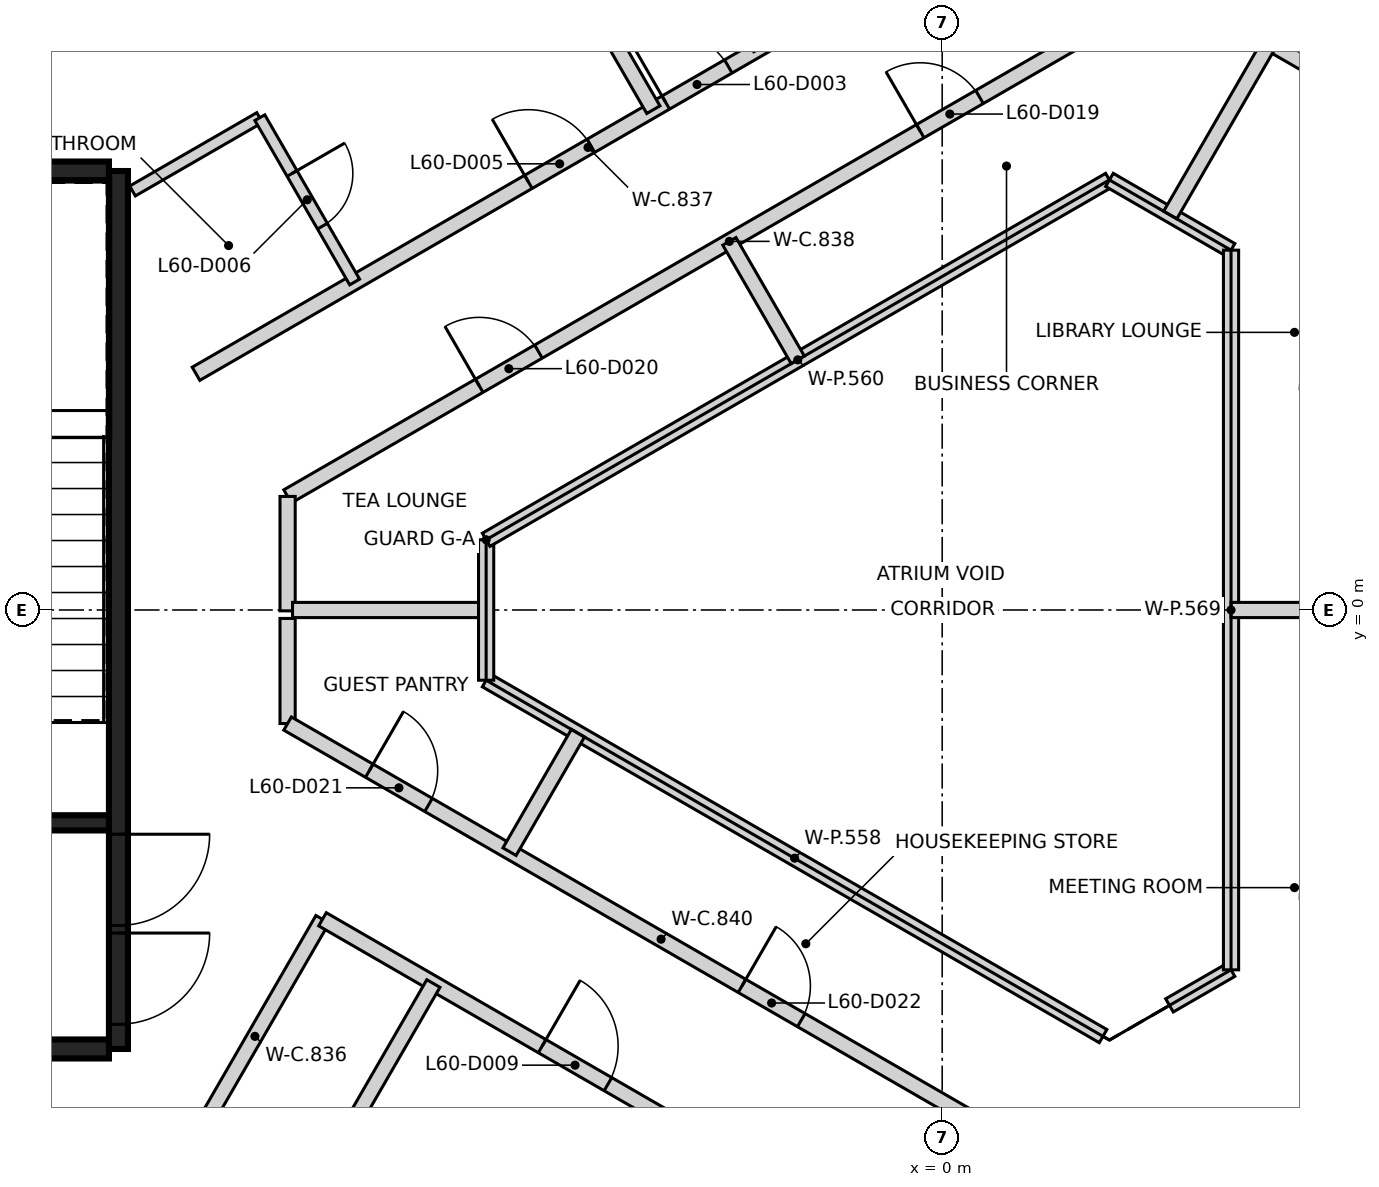
"""IFC4 building model, lengths in metres.
Left out: names, types, materials, properties, quantities, classifications, styles, units other than length and angle.
Written with IfcOpenShell. Run it as: python <this file> out.ifc"""

import sys

from ifc_helpers import new_model, si_unit, direction, frame, frame_2d, origin, place, context, subcontext, project, spatial, rectangle, extrude, element, fill, save


model = new_model("IFC4")
c1 = context("Model", 3, precision=1e-05, world=origin(), true_north=direction((0.0, 1.0)))
c2 = subcontext(c1, "Body", "Model", "MODEL_VIEW")
j1 = project(units=[si_unit("LENGTHUNIT", "METRE"), si_unit("PLANEANGLEUNIT", "RADIAN")], contexts=[c1])
p1 = place(None, origin())
s1 = spatial("IfcSite", under=j1, at=p1, CompositionType="ELEMENT")
p2 = place(p1, origin())
s2 = spatial("IfcBuilding", under=s1, at=p2, CompositionType="ELEMENT")
p3 = place(p2, frame((0.0, 0.0, 239.4)))
s3 = spatial("IfcBuildingStorey", under=s2, at=p3, CompositionType="ELEMENT", Elevation=239.4)
p4 = place(p3, frame((-10.837, 5.775, 0.0), z_axis=(0.0, 0.0, 1.0), x_axis=(0.0, -1.0, 0.0)))
e1 = element("IfcWall", 1, at=p4, inside=s3, PredefinedType="SHEAR", context=c2, shape_type="SweptSolid", body=[
    extrude(rectangle(XDim=11.55, YDim=0.25, at=frame_2d((5.775, 0.0))), origin(), (0.0, 0.0, 1.0), 3.25),
])
p5 = place(p4, frame((10.025, 0.0, 0.0)))
e2 = element("IfcOpeningElement", 2, at=p5, cuts=e1, PredefinedType="OPENING", context=c2, shape_type="SweptSolid", body=[
    extrude(rectangle(XDim=1.2, YDim=2.1, at=frame_2d((0.6, 1.05))), frame((0.0, 0.135, 0.0), z_axis=(0.0, -1.0, 0.0), x_axis=(1.0, 0.0, 0.0)), (0.0, 0.0, 1.0), 0.27),
])
p6 = place(p4, frame((8.725, 0.0, 0.0)))
e3 = element("IfcOpeningElement", 3, at=p6, cuts=e1, PredefinedType="OPENING", context=c2, shape_type="SweptSolid", body=[
    extrude(rectangle(XDim=1.2, YDim=2.1, at=frame_2d((0.6, 1.05))), frame((0.0, 0.135, 0.0), z_axis=(0.0, -1.0, 0.0), x_axis=(1.0, 0.0, 0.0)), (0.0, 0.0, 1.0), 0.27),
])
p7 = place(p3, frame((-10.963, -5.775, 0.0), z_axis=(0.0, 0.0, 1.0), x_axis=(-1.0, 0.0, 0.0)))
e4 = element("IfcWall", 4, at=p7, inside=s3, PredefinedType="SHEAR", context=c2, shape_type="SweptSolid", body=[
    extrude(rectangle(XDim=5.225, YDim=0.25, at=frame_2d((2.612, 0.0))), origin(), (0.0, 0.0, 1.0), 3.25),
])
p8 = place(p3, frame((-16.472, 5.775, 0.0), z_axis=(0.0, 0.0, 1.0), x_axis=(1.0, 0.0, 0.0)))
e5 = element("IfcWall", 5, at=p8, inside=s3, PredefinedType="SHEAR", context=c2, shape_type="SweptSolid", body=[
    extrude(rectangle(XDim=5.51, YDim=0.25, at=frame_2d((2.755, 0.0))), origin(), (0.0, 0.0, 1.0), 3.25),
])
p9 = place(p3, frame((-10.963, -2.8, 0.0), z_axis=(0.0, 0.0, 1.0), x_axis=(-1.0, 0.0, 0.0)))
e6 = element("IfcWall", 6, at=p9, inside=s3, PredefinedType="SHEAR", context=c2, shape_type="SweptSolid", body=[
    extrude(rectangle(XDim=5.098, YDim=0.2, at=frame_2d((2.549, 0.0))), origin(), (0.0, 0.0, 1.0), 3.25),
])
p10 = place(p9, frame((1.774, 0.0, 0.0)))
e7 = element("IfcOpeningElement", 7, at=p10, cuts=e6, PredefinedType="OPENING", context=c2, shape_type="SweptSolid", body=[
    extrude(rectangle(XDim=1.4, YDim=2.1, at=frame_2d((0.7, 1.05))), frame((0.0, 0.11, 0.0), z_axis=(0.0, -1.0, 0.0), x_axis=(1.0, 0.0, 0.0)), (0.0, 0.0, 1.0), 0.22),
])
p11 = place(p3, frame((10.42, 6.498, 0.0), z_axis=(0.0, 0.0, 1.0), x_axis=(-0.866021906294, 0.500006057782, 0.0)))
e8 = element("IfcWall", 8, at=p11, inside=s3, PredefinedType="SHEAR", context=c2, shape_type="SweptSolid", body=[
    extrude(rectangle(XDim=11.55, YDim=0.25, at=frame_2d((5.775, 0.0))), origin(), (0.0, 0.0, 1.0), 3.25),
])
p12 = place(p11, frame((10.025, 0.0, 0.0)))
e9 = element("IfcOpeningElement", 9, at=p12, cuts=e8, PredefinedType="OPENING", context=c2, shape_type="SweptSolid", body=[
    extrude(rectangle(XDim=1.2, YDim=2.1, at=frame_2d((0.6, 1.05))), frame((0.0, 0.135, 0.0), z_axis=(0.0, -1.0, 0.0), x_axis=(1.0, 0.0, 0.0)), (0.0, 0.0, 1.0), 0.27),
])
p13 = place(p11, frame((8.725, 0.0, 0.0)))
e10 = element("IfcOpeningElement", 10, at=p13, cuts=e8, PredefinedType="OPENING", context=c2, shape_type="SweptSolid", body=[
    extrude(rectangle(XDim=1.2, YDim=2.1, at=frame_2d((0.6, 1.05))), frame((0.0, 0.135, 0.0), z_axis=(0.0, -1.0, 0.0), x_axis=(1.0, 0.0, 0.0)), (0.0, 0.0, 1.0), 0.27),
])
p14 = place(p3, frame((0.417, -12.273, 0.0), z_axis=(0.0, 0.0, 1.0), x_axis=(0.866021906294, 0.500006057782, 0.0)))
e11 = element("IfcWall", 11, at=p14, inside=s3, PredefinedType="SHEAR", context=c2, shape_type="SweptSolid", body=[
    extrude(rectangle(XDim=11.55, YDim=0.25, at=frame_2d((5.775, 0.0))), origin(), (0.0, 0.0, 1.0), 3.25),
])
p15 = place(p14, frame((10.025, 0.0, 0.0)))
e12 = element("IfcOpeningElement", 12, at=p15, cuts=e11, PredefinedType="OPENING", context=c2, shape_type="SweptSolid", body=[
    extrude(rectangle(XDim=1.2, YDim=2.1, at=frame_2d((0.6, 1.05))), frame((0.0, 0.135, 0.0), z_axis=(0.0, -1.0, 0.0), x_axis=(1.0, 0.0, 0.0)), (0.0, 0.0, 1.0), 0.27),
])
p16 = place(p14, frame((8.725, 0.0, 0.0)))
e13 = element("IfcOpeningElement", 13, at=p16, cuts=e11, PredefinedType="OPENING", context=c2, shape_type="SweptSolid", body=[
    extrude(rectangle(XDim=1.2, YDim=2.1, at=frame_2d((0.6, 1.05))), frame((0.0, 0.135, 0.0), z_axis=(0.0, -1.0, 0.0), x_axis=(1.0, 0.0, 0.0)), (0.0, 0.0, 1.0), 0.27),
])
p17 = place(p3, frame((-9.931, -7.149, 0.0), z_axis=(0.0, 0.0, 1.0), x_axis=(0.499934418432, 0.86606326401, 0.0)))
e14 = element("IfcWall", 14, at=p17, inside=s3, PredefinedType="PARTITIONING", context=c2, shape_type="SweptSolid", body=[
    extrude(rectangle(XDim=3.556, YDim=0.2, at=frame_2d((1.778, 0.0))), origin(), (0.0, 0.0, 1.0), 3.25),
])
p18 = place(p3, frame((-9.817, 3.108, 0.0), z_axis=(0.0, 0.0, 1.0), x_axis=(0.86603471326, 0.499983875168, 0.0)))
e15 = element("IfcWall", 15, at=p18, inside=s3, PredefinedType="PARTITIONING", context=c2, shape_type="SweptSolid", body=[
    extrude(rectangle(XDim=11.911, YDim=0.2, at=frame_2d((5.955, 0.0))), origin(), (0.0, 0.0, 1.0), 3.25),
])
p19 = place(p18, frame((7.136, 0.0, 0.0)))
e16 = element("IfcOpeningElement", 16, at=p19, cuts=e15, PredefinedType="OPENING", context=c2, shape_type="SweptSolid", body=[
    extrude(rectangle(XDim=0.95, YDim=2.1, at=frame_2d((0.475, 1.05))), frame((0.0, 0.11, 0.0), z_axis=(0.0, -1.0, 0.0), x_axis=(1.0, 0.0, 0.0)), (0.0, 0.0, 1.0), 0.22),
])
p20 = place(p18, frame((5.049, 0.0, 0.0)))
e17 = element("IfcOpeningElement", 17, at=p20, cuts=e15, PredefinedType="OPENING", context=c2, shape_type="SweptSolid", body=[
    extrude(rectangle(XDim=0.95, YDim=2.1, at=frame_2d((0.475, 1.05))), frame((0.0, 0.11, 0.0), z_axis=(0.0, -1.0, 0.0), x_axis=(1.0, 0.0, 0.0)), (0.0, 0.0, 1.0), 0.22),
])
p21 = place(p3, frame((-8.612, 1.494, 0.0), z_axis=(0.0, 0.0, 1.0), x_axis=(0.8660441356, 0.49996755414, 0.0)))
e18 = element("IfcWall", 18, at=p21, inside=s3, PredefinedType="PARTITIONING", context=c2, shape_type="SweptSolid", body=[
    extrude(rectangle(XDim=13.422, YDim=0.2, at=frame_2d((6.711, 0.0))), origin(), (0.0, 0.0, 1.0), 3.25),
])
p22 = place(p21, frame((9.611, 0.0, 0.0)))
e19 = element("IfcOpeningElement", 19, at=p22, cuts=e18, PredefinedType="OPENING", context=c2, shape_type="SweptSolid", body=[
    extrude(rectangle(XDim=0.9, YDim=2.1, at=frame_2d((0.45, 1.05))), frame((0.0, 0.11, 0.0), z_axis=(0.0, -1.0, 0.0), x_axis=(1.0, 0.0, 0.0)), (0.0, 0.0, 1.0), 0.22),
])
p23 = place(p21, frame((2.911, 0.0, 0.0)))
e20 = element("IfcOpeningElement", 20, at=p23, cuts=e18, PredefinedType="OPENING", context=c2, shape_type="SweptSolid", body=[
    extrude(rectangle(XDim=0.9, YDim=2.1, at=frame_2d((0.45, 1.05))), frame((0.0, 0.11, 0.0), z_axis=(0.0, -1.0, 0.0), x_axis=(1.0, 0.0, 0.0)), (0.0, 0.0, 1.0), 0.22),
])
p24 = place(p3, frame((-8.612, -1.494, 0.0), z_axis=(0.0, 0.0, 1.0), x_axis=(0.0, 1.0, 0.0)))
e21 = element("IfcWall", 21, at=p24, inside=s3, PredefinedType="PARTITIONING", context=c2, shape_type="SweptSolid", body=[
    extrude(rectangle(XDim=1.383, YDim=0.2, at=frame_2d((0.691, 0.0))), origin(), (0.0, 0.0, 1.0), 3.25),
])
p25 = place(p3, frame((-8.612, -1.494, 0.0), z_axis=(0.0, 0.0, 1.0), x_axis=(0.866035468681, -0.499982566683, 0.0)))
e22 = element("IfcWall", 22, at=p25, inside=s3, PredefinedType="PARTITIONING", context=c2, shape_type="SweptSolid", body=[
    extrude(rectangle(XDim=11.348, YDim=0.2, at=frame_2d((5.674, 0.0))), origin(), (0.0, 0.0, 1.0), 3.25),
])
p26 = place(p25, frame((1.241, 0.0, 0.0)))
e23 = element("IfcOpeningElement", 23, at=p26, cuts=e22, PredefinedType="OPENING", context=c2, shape_type="SweptSolid", body=[
    extrude(rectangle(XDim=0.9, YDim=2.1, at=frame_2d((0.45, 1.05))), frame((0.0, 0.11, 0.0), z_axis=(0.0, -1.0, 0.0), x_axis=(1.0, 0.0, 0.0)), (0.0, 0.0, 1.0), 0.22),
])
p27 = place(p25, frame((6.903, 0.0, 0.0)))
e24 = element("IfcOpeningElement", 24, at=p27, cuts=e22, PredefinedType="OPENING", context=c2, shape_type="SweptSolid", body=[
    extrude(rectangle(XDim=0.9, YDim=2.1, at=frame_2d((0.45, 1.05))), frame((0.0, 0.11, 0.0), z_axis=(0.0, -1.0, 0.0), x_axis=(1.0, 0.0, 0.0)), (0.0, 0.0, 1.0), 0.22),
])
p28 = place(p3, frame((-8.612, -0.011, 0.0), z_axis=(0.0, 0.0, 1.0), x_axis=(0.0, 1.0, 0.0)))
e25 = element("IfcWall", 25, at=p28, inside=s3, PredefinedType="PARTITIONING", context=c2, shape_type="SweptSolid", body=[
    extrude(rectangle(XDim=1.505, YDim=0.2, at=frame_2d((0.752, 0.0))), origin(), (0.0, 0.0, 1.0), 3.25),
])
p29 = place(p3, frame((-8.153, -4.069, 0.0), z_axis=(0.0, 0.0, 1.0), x_axis=(0.865955522833, -0.500121017829, 0.0)))
e26 = element("IfcWall", 26, at=p29, inside=s3, PredefinedType="PARTITIONING", context=c2, shape_type="SweptSolid", body=[
    extrude(rectangle(XDim=12.937, YDim=0.2, at=frame_2d((6.469, 0.0))), origin(), (0.0, 0.0, 1.0), 3.25),
])
p30 = place(p29, frame((3.337, 0.0, 0.0)))
e27 = element("IfcOpeningElement", 27, at=p30, cuts=e26, PredefinedType="OPENING", context=c2, shape_type="SweptSolid", body=[
    extrude(rectangle(XDim=1.0, YDim=2.1, at=frame_2d((0.5, 1.05))), frame((0.0, 0.11, 0.0), z_axis=(0.0, -1.0, 0.0), x_axis=(1.0, 0.0, 0.0)), (0.0, 0.0, 1.0), 0.22),
])
p31 = place(p29, frame((9.153, 0.0, 0.0)))
e28 = element("IfcOpeningElement", 28, at=p31, cuts=e26, PredefinedType="OPENING", context=c2, shape_type="SweptSolid", body=[
    extrude(rectangle(XDim=0.95, YDim=2.1, at=frame_2d((0.475, 1.05))), frame((0.0, 0.11, 0.0), z_axis=(0.0, -1.0, 0.0), x_axis=(1.0, 0.0, 0.0)), (0.0, 0.0, 1.0), 0.22),
])
p32 = place(p29, frame((11.144, 0.0, 0.0)))
e29 = element("IfcOpeningElement", 29, at=p32, cuts=e26, PredefinedType="OPENING", context=c2, shape_type="SweptSolid", body=[
    extrude(rectangle(XDim=1.0, YDim=2.1, at=frame_2d((0.5, 1.05))), frame((0.0, 0.11, 0.0), z_axis=(0.0, -1.0, 0.0), x_axis=(1.0, 0.0, 0.0)), (0.0, 0.0, 1.0), 0.22),
])
p33 = place(p3, frame((3.011, 8.204, 0.0), z_axis=(0.0, 0.0, 1.0), x_axis=(0.86628077395, -0.499557424812, 0.0)))
e30 = element("IfcWall", 30, at=p33, inside=s3, PredefinedType="PARTITIONING", context=c2, shape_type="SweptSolid", body=[
    extrude(rectangle(XDim=2.989, YDim=0.2, at=frame_2d((1.494, 0.0))), origin(), (0.0, 0.0, 1.0), 3.25),
])
p34 = place(p3, frame((-12.407, -14.806, 0.0), z_axis=(0.0, 0.0, 1.0), x_axis=(0.500104175471, 0.865965249693, 0.0)))
e31 = element("IfcWall", 31, at=p34, inside=s3, PredefinedType="PARTITIONING", context=c2, shape_type="SweptSolid", body=[
    extrude(rectangle(XDim=11.423, YDim=0.2, at=frame_2d((5.711, 0.0))), origin(), (0.0, 0.0, 1.0), 2.35),
])
p35 = place(p3, frame((-9.525, 16.498, 0.0), z_axis=(0.0, 0.0, 1.0), x_axis=(0.500030684965, -0.866007687087, 0.0)))
e32 = element("IfcWall", 32, at=p35, inside=s3, PredefinedType="PARTITIONING", context=c2, shape_type="SweptSolid", body=[
    extrude(rectangle(XDim=11.45, YDim=0.2, at=frame_2d((5.725, 0.0))), origin(), (0.0, 0.0, 1.0), 3.25),
])
p36 = place(p3, frame((-8.547, 0.0, 0.0), z_axis=(0.0, 0.0, 1.0), x_axis=(1.0, 0.0, 0.0)))
e33 = element("IfcWall", 33, at=p36, inside=s3, PredefinedType="PARTITIONING", context=c2, shape_type="SweptSolid", body=[
    extrude(rectangle(XDim=2.547, YDim=0.2, at=frame_2d((1.273, 0.0))), origin(), (0.0, 0.0, 1.0), 3.25),
])
p37 = place(p3, frame((-6.0, -0.924, 0.0), z_axis=(0.0, 0.0, 1.0), x_axis=(0.866223755075, -0.499656288007, 0.0)))
e34 = element("IfcWall", 34, at=p37, inside=s3, PredefinedType="PARTITIONING", context=c2, shape_type="SweptSolid", body=[
    extrude(rectangle(XDim=9.37, YDim=0.2, at=frame_2d((4.685, 0.0))), origin(), (0.0, 0.0, 1.0), 3.25),
])
p38 = place(p3, frame((-6.0, -0.924, 0.0), z_axis=(0.0, 0.0, 1.0), x_axis=(0.0, 1.0, 0.0)))
e35 = element("IfcWall", 35, at=p38, inside=s3, PredefinedType="PARTITIONING", context=c2, shape_type="SweptSolid", body=[
    extrude(rectangle(XDim=1.848, YDim=0.2, at=frame_2d((0.924, 0.0))), origin(), (0.0, 0.0, 1.0), 3.25),
])
p39 = place(p3, frame((-6.0, 0.924, 0.0), z_axis=(0.0, 0.0, 1.0), x_axis=(0.866012967051, 0.500021540435, 0.0)))
e36 = element("IfcWall", 36, at=p39, inside=s3, PredefinedType="PARTITIONING", context=c2, shape_type="SweptSolid", body=[
    extrude(rectangle(XDim=9.468, YDim=0.2, at=frame_2d((4.734, 0.0))), origin(), (0.0, 0.0, 1.0), 3.25),
])
for number, where, z_axis, x_axis in (
    (37, (-5.692, -3.179, 0.0), (0.0, 0.0, 1.0), (0.5, 0.866, 0.0)),
    (38, (-2.8, 4.85, 0.0), (0.0, 0.0, 1.0), (0.5, -0.866, 0.0)),
):
    element("IfcWall", number, at=place(p3, frame(where, z_axis=z_axis, x_axis=x_axis)), inside=s3, PredefinedType="PARTITIONING", context=c2, shape_type="SweptSolid", body=[
        extrude(rectangle(XDim=1.8, YDim=0.2, at=frame_2d((0.9, 0.0))), origin(), (0.0, 0.0, 1.0), 3.25),
    ])
p40 = place(p3, frame((2.2, 5.658, 0.0), z_axis=(0.0, 0.0, 1.0), x_axis=(0.865818011038, -0.500359042851, 0.0)))
e39 = element("IfcWall", 39, at=p40, inside=s3, PredefinedType="PARTITIONING", context=c2, shape_type="SweptSolid", body=[
    extrude(rectangle(XDim=1.848, YDim=0.2, at=frame_2d((0.924, 0.0))), origin(), (0.0, 0.0, 1.0), 3.25),
])
p41 = place(p3, frame((2.99, -5.202, 0.0), z_axis=(0.0, 0.0, 1.0), x_axis=(0.865872609263, 0.500264554538, 0.0)))
e40 = element("IfcWall", 40, at=p41, inside=s3, PredefinedType="PARTITIONING", context=c2, shape_type="SweptSolid", body=[
    extrude(rectangle(XDim=0.936, YDim=0.2, at=frame_2d((0.468, 0.0))), origin(), (0.0, 0.0, 1.0), 3.25),
])
p42 = place(p3, frame((3.0, 5.196, 0.0), z_axis=(0.0, 0.0, 1.0), x_axis=(0.500076354988, 0.865981315724, 0.0)))
e41 = element("IfcWall", 41, at=p42, inside=s3, PredefinedType="PARTITIONING", context=c2, shape_type="SweptSolid", body=[
    extrude(rectangle(XDim=2.607, YDim=0.2, at=frame_2d((1.304, 0.0))), origin(), (0.0, 0.0, 1.0), 3.25),
])
p43 = place(p3, frame((3.8, -4.734, 0.0), z_axis=(0.0, 0.0, 1.0), x_axis=(0.0, 1.0, 0.0)))
e42 = element("IfcWall", 42, at=p43, inside=s3, PredefinedType="PARTITIONING", context=c2, shape_type="SweptSolid", body=[
    extrude(rectangle(XDim=9.468, YDim=0.2, at=frame_2d((4.734, 0.0))), origin(), (0.0, 0.0, 1.0), 3.25),
])
p44 = place(p3, frame((3.8, 0.0, 0.0), z_axis=(0.0, 0.0, 1.0), x_axis=(1.0, 0.0, 0.0)))
e43 = element("IfcWall", 43, at=p44, inside=s3, PredefinedType="PARTITIONING", context=c2, shape_type="SweptSolid", body=[
    extrude(rectangle(XDim=1.8, YDim=0.2, at=frame_2d((0.9, 0.0))), origin(), (0.0, 0.0, 1.0), 3.25),
])
p45 = place(p3, frame((-10.652, 5.512, 0.0), z_axis=(0.0, 0.0, 1.0), x_axis=(0.866017156151, 0.500014285048, 0.0)))
e44 = element("IfcWall", 44, at=p45, inside=s3, PredefinedType="PARTITIONING", context=c2, shape_type="SweptSolid", body=[
    extrude(rectangle(XDim=1.931, YDim=0.15, at=frame_2d((0.966, 0.0))), origin(), (0.0, 0.0, 1.0), 3.25),
])
p46 = place(p3, frame((-8.977, 6.477, 0.0), z_axis=(0.0, 0.0, 1.0), x_axis=(0.499632127845, -0.86623769072, 0.0)))
e45 = element("IfcWall", 45, at=p46, inside=s3, PredefinedType="PARTITIONING", context=c2, shape_type="SweptSolid", body=[
    extrude(rectangle(XDim=2.496, YDim=0.15, at=frame_2d((1.248, 0.0))), origin(), (0.0, 0.0, 1.0), 3.25),
])
p47 = place(p46, frame((0.847, 0.0, 0.0)))
e46 = element("IfcOpeningElement", 46, at=p47, cuts=e45, PredefinedType="OPENING", context=c2, shape_type="SweptSolid", body=[
    extrude(rectangle(XDim=0.8, YDim=2.1, at=frame_2d((0.4, 1.05))), frame((0.0, 0.085, 0.0), z_axis=(0.0, -1.0, 0.0), x_axis=(1.0, 0.0, 0.0)), (0.0, 0.0, 1.0), 0.17),
])
p48 = place(p5, origin())
e47 = element("IfcDoor", 47, at=p48, inside=s3, OperationType="SINGLE_SWING_LEFT", PredefinedType="DOOR", context=c2, shape_type="SweptSolid", body=[
    extrude(rectangle(XDim=1.2, YDim=2.1, at=frame_2d((0.6, 1.05))), frame((0.0, 0.025, 0.0), z_axis=(0.0, -1.0, 0.0), x_axis=(1.0, 0.0, 0.0)), (0.0, 0.0, 1.0), 0.05),
])
fill(e2, e47)
p49 = place(p6, origin())
e48 = element("IfcDoor", 48, at=p49, inside=s3, OperationType="SINGLE_SWING_RIGHT", PredefinedType="DOOR", context=c2, shape_type="SweptSolid", body=[
    extrude(rectangle(XDim=1.2, YDim=2.1, at=frame_2d((0.6, 1.05))), frame((0.0, 0.025, 0.0), z_axis=(0.0, -1.0, 0.0), x_axis=(1.0, 0.0, 0.0)), (0.0, 0.0, 1.0), 0.05),
])
fill(e3, e48)
p50 = place(p19, origin())
e49 = element("IfcDoor", 49, at=p50, inside=s3, OperationType="SINGLE_SWING_LEFT", PredefinedType="DOOR", context=c2, shape_type="SweptSolid", body=[
    extrude(rectangle(XDim=0.95, YDim=2.1, at=frame_2d((0.475, 1.05))), frame((0.0, 0.025, 0.0), z_axis=(0.0, -1.0, 0.0), x_axis=(1.0, 0.0, 0.0)), (0.0, 0.0, 1.0), 0.05),
])
fill(e16, e49)
p51 = place(p20, origin())
e50 = element("IfcDoor", 50, at=p51, inside=s3, OperationType="SINGLE_SWING_LEFT", PredefinedType="DOOR", context=c2, shape_type="SweptSolid", body=[
    extrude(rectangle(XDim=0.95, YDim=2.1, at=frame_2d((0.475, 1.05))), frame((0.0, 0.025, 0.0), z_axis=(0.0, -1.0, 0.0), x_axis=(1.0, 0.0, 0.0)), (0.0, 0.0, 1.0), 0.05),
])
fill(e17, e50)
p52 = place(p47, frame((0.8, 0.0, 0.0), z_axis=(0.0, 0.0, 1.0), x_axis=(-1.0, 0.0, 0.0)))
e51 = element("IfcDoor", 51, at=p52, inside=s3, OperationType="SINGLE_SWING_LEFT", PredefinedType="DOOR", context=c2, shape_type="SweptSolid", body=[
    extrude(rectangle(XDim=0.8, YDim=2.1, at=frame_2d((0.4, 1.05))), frame((0.0, 0.025, 0.0), z_axis=(0.0, -1.0, 0.0), x_axis=(1.0, 0.0, 0.0)), (0.0, 0.0, 1.0), 0.05),
])
fill(e46, e51)
p53 = place(p30, frame((1.0, 0.0, 0.0), z_axis=(0.0, 0.0, 1.0), x_axis=(-1.0, 0.0, 0.0)))
e52 = element("IfcDoor", 52, at=p53, inside=s3, OperationType="SINGLE_SWING_LEFT", PredefinedType="DOOR", context=c2, shape_type="SweptSolid", body=[
    extrude(rectangle(XDim=1.0, YDim=2.1, at=frame_2d((0.5, 1.05))), frame((0.0, 0.025, 0.0), z_axis=(0.0, -1.0, 0.0), x_axis=(1.0, 0.0, 0.0)), (0.0, 0.0, 1.0), 0.05),
])
fill(e27, e52)
p54 = place(p22, frame((0.9, 0.0, 0.0), z_axis=(0.0, 0.0, 1.0), x_axis=(-1.0, 0.0, 0.0)))
e53 = element("IfcDoor", 53, at=p54, inside=s3, OperationType="SINGLE_SWING_LEFT", PredefinedType="DOOR", context=c2, shape_type="SweptSolid", body=[
    extrude(rectangle(XDim=0.9, YDim=2.1, at=frame_2d((0.45, 1.05))), frame((0.0, 0.025, 0.0), z_axis=(0.0, -1.0, 0.0), x_axis=(1.0, 0.0, 0.0)), (0.0, 0.0, 1.0), 0.05),
])
fill(e19, e53)
p55 = place(p23, frame((0.9, 0.0, 0.0), z_axis=(0.0, 0.0, 1.0), x_axis=(-1.0, 0.0, 0.0)))
e54 = element("IfcDoor", 54, at=p55, inside=s3, OperationType="SINGLE_SWING_LEFT", PredefinedType="DOOR", context=c2, shape_type="SweptSolid", body=[
    extrude(rectangle(XDim=0.9, YDim=2.1, at=frame_2d((0.45, 1.05))), frame((0.0, 0.025, 0.0), z_axis=(0.0, -1.0, 0.0), x_axis=(1.0, 0.0, 0.0)), (0.0, 0.0, 1.0), 0.05),
])
fill(e20, e54)
p56 = place(p26, origin())
e55 = element("IfcDoor", 55, at=p56, inside=s3, OperationType="SINGLE_SWING_LEFT", PredefinedType="DOOR", context=c2, shape_type="SweptSolid", body=[
    extrude(rectangle(XDim=0.9, YDim=2.1, at=frame_2d((0.45, 1.05))), frame((0.0, 0.025, 0.0), z_axis=(0.0, -1.0, 0.0), x_axis=(1.0, 0.0, 0.0)), (0.0, 0.0, 1.0), 0.05),
])
fill(e23, e55)
p57 = place(p27, origin())
e56 = element("IfcDoor", 56, at=p57, inside=s3, OperationType="SINGLE_SWING_LEFT", PredefinedType="DOOR", context=c2, shape_type="SweptSolid", body=[
    extrude(rectangle(XDim=0.9, YDim=2.1, at=frame_2d((0.45, 1.05))), frame((0.0, 0.025, 0.0), z_axis=(0.0, -1.0, 0.0), x_axis=(1.0, 0.0, 0.0)), (0.0, 0.0, 1.0), 0.05),
])
fill(e24, e56)
save(model, sys.argv[1])
